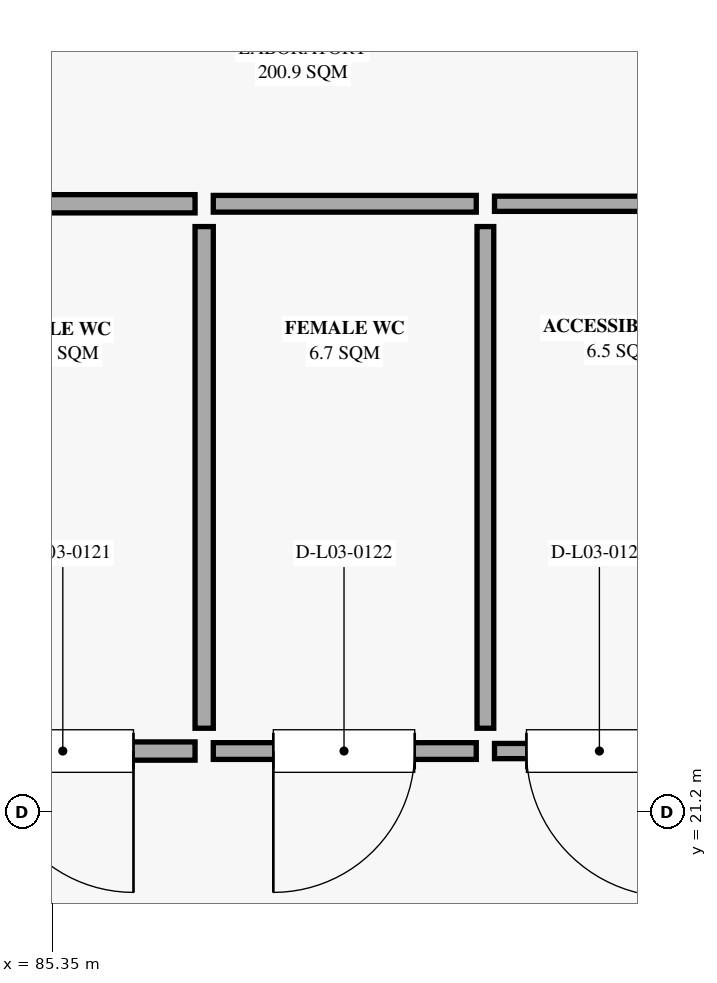
"""IFC4 building model, lengths in metres.
Left out: names, types, materials, properties, quantities, classifications, styles, units other than length and angle.
Written with IfcOpenShell. Run it as: python <this file> out.ifc"""

import sys

from ifc_helpers import new_model, si_unit, direction, frame, frame_2d, origin, place, context, subcontext, project, spatial, rectangle, extrude, element, fill, save


model = new_model("IFC4")
c1 = context("Model", 3, precision=1e-05, world=origin(), true_north=direction((0.0, 1.0)))
c2 = subcontext(c1, "Body", "Model", "MODEL_VIEW")
j1 = project(units=[si_unit("LENGTHUNIT", "METRE"), si_unit("PLANEANGLEUNIT", "RADIAN")], contexts=[c1])
p1 = place(None, origin())
s1 = spatial("IfcSite", under=j1, at=p1, CompositionType="ELEMENT")
p2 = place(p1, origin())
s2 = spatial("IfcBuilding", under=s1, at=p2, CompositionType="ELEMENT")
p3 = place(p2, frame((0.0, 0.0, 15.12)))
s3 = spatial("IfcBuildingStorey", under=s2, at=p3, CompositionType="ELEMENT", Elevation=15.12)
p4 = place(p3, frame((86.29, 21.6, 0.0), z_axis=(0.0, 0.0, 1.0), x_axis=(-1.0, 0.0, 0.0)))
e1 = element("IfcWall", 1, at=p4, inside=s3, PredefinedType="PARTITIONING", context=c2, shape_type="SweptSolid", body=[
    extrude(rectangle(XDim=1.73, YDim=0.12, at=frame_2d((0.865, 0.0))), origin(), (0.0, 0.0, 1.0), 3.16),
])
p5 = place(p4, frame((0.405, 0.0, 0.0)))
e2 = element("IfcOpeningElement", 2, at=p5, cuts=e1, PredefinedType="OPENING", context=c2, shape_type="SweptSolid", body=[
    extrude(rectangle(XDim=0.93, YDim=2.16, at=frame_2d((0.465, 1.08))), frame((0.0, 0.07, 0.0), z_axis=(0.0, -1.0, 0.0), x_axis=(1.0, 0.0, 0.0)), (0.0, 0.0, 1.0), 0.14),
])
p6 = place(p3, frame((84.56, 25.2, 0.0), z_axis=(0.0, 0.0, 1.0), x_axis=(1.0, 0.0, 0.0)))
e3 = element("IfcWall", 3, at=p6, inside=s3, PredefinedType="PARTITIONING", context=c2, shape_type="SweptSolid", body=[
    extrude(rectangle(XDim=1.73, YDim=0.12, at=frame_2d((0.865, 0.0))), origin(), (0.0, 0.0, 1.0), 3.16),
])
p7 = place(p3, frame((86.35, 25.05, 0.0), z_axis=(0.0, 0.0, 1.0), x_axis=(0.0, -1.0, 0.0)))
e4 = element("IfcWall", 4, at=p7, inside=s3, PredefinedType="PARTITIONING", context=c2, shape_type="SweptSolid", body=[
    extrude(rectangle(XDim=3.3, YDim=0.12, at=frame_2d((1.65, 0.0))), origin(), (0.0, 0.0, 1.0), 3.16),
])
p8 = place(p3, frame((88.14, 21.6, 0.0), z_axis=(0.0, 0.0, 1.0), x_axis=(-1.0, 0.0, 0.0)))
e5 = element("IfcWall", 5, at=p8, inside=s3, PredefinedType="PARTITIONING", context=c2, shape_type="SweptSolid", body=[
    extrude(rectangle(XDim=1.73, YDim=0.11, at=frame_2d((0.865, 0.0))), origin(), (0.0, 0.0, 1.0), 3.16),
])
p9 = place(p8, frame((0.405, 0.0, 0.0)))
e6 = element("IfcOpeningElement", 6, at=p9, cuts=e5, PredefinedType="OPENING", context=c2, shape_type="SweptSolid", body=[
    extrude(rectangle(XDim=0.93, YDim=2.22, at=frame_2d((0.465, 1.11))), frame((0.0, 0.065, 0.0), z_axis=(0.0, -1.0, 0.0), x_axis=(1.0, 0.0, 0.0)), (0.0, 0.0, 1.0), 0.13),
])
p10 = place(p3, frame((86.41, 25.2, 0.0), z_axis=(0.0, 0.0, 1.0), x_axis=(1.0, 0.0, 0.0)))
e7 = element("IfcWall", 7, at=p10, inside=s3, PredefinedType="PARTITIONING", context=c2, shape_type="SweptSolid", body=[
    extrude(rectangle(XDim=1.73, YDim=0.11, at=frame_2d((0.865, 0.0))), origin(), (0.0, 0.0, 1.0), 3.16),
])
p11 = place(p3, frame((88.2, 25.05, 0.0), z_axis=(0.0, 0.0, 1.0), x_axis=(0.0, -1.0, 0.0)))
e8 = element("IfcWall", 8, at=p11, inside=s3, PredefinedType="PARTITIONING", context=c2, shape_type="SweptSolid", body=[
    extrude(rectangle(XDim=3.3, YDim=0.11, at=frame_2d((1.65, 0.0))), origin(), (0.0, 0.0, 1.0), 3.16),
])
p12 = place(p3, frame((89.94, 21.6, 0.0), z_axis=(0.0, 0.0, 1.0), x_axis=(-1.0, 0.0, 0.0)))
e9 = element("IfcWall", 9, at=p12, inside=s3, PredefinedType="PARTITIONING", context=c2, shape_type="SweptSolid", body=[
    extrude(rectangle(XDim=1.68, YDim=0.1, at=frame_2d((0.84, 0.0))), origin(), (0.0, 0.0, 1.0), 3.16),
])
p13 = place(p12, frame((0.51, 0.0, 0.0)))
e10 = element("IfcOpeningElement", 10, at=p13, cuts=e9, PredefinedType="OPENING", context=c2, shape_type="SweptSolid", body=[
    extrude(rectangle(XDim=0.96, YDim=2.05, at=frame_2d((0.48, 1.025))), frame((0.0, 0.06, 0.0), z_axis=(0.0, -1.0, 0.0), x_axis=(1.0, 0.0, 0.0)), (0.0, 0.0, 1.0), 0.12),
])
p14 = place(p3, frame((88.26, 25.2, 0.0), z_axis=(0.0, 0.0, 1.0), x_axis=(1.0, 0.0, 0.0)))
e11 = element("IfcWall", 11, at=p14, inside=s3, PredefinedType="PARTITIONING", context=c2, shape_type="SweptSolid", body=[
    extrude(rectangle(XDim=1.68, YDim=0.1, at=frame_2d((0.84, 0.0))), origin(), (0.0, 0.0, 1.0), 3.16),
])
p15 = place(p5, origin())
e12 = element("IfcDoor", 12, at=p15, inside=s3, OperationType="SINGLE_SWING_LEFT", PredefinedType="DOOR", context=c2, shape_type="SweptSolid", body=[
    extrude(rectangle(XDim=0.93, YDim=2.16, at=frame_2d((0.465, 1.08))), frame((0.0, 0.025, 0.0), z_axis=(0.0, -1.0, 0.0), x_axis=(1.0, 0.0, 0.0)), (0.0, 0.0, 1.0), 0.05),
])
fill(e2, e12)
p16 = place(p9, origin())
e13 = element("IfcDoor", 13, at=p16, inside=s3, OperationType="SINGLE_SWING_RIGHT", PredefinedType="DOOR", context=c2, shape_type="SweptSolid", body=[
    extrude(rectangle(XDim=0.93, YDim=2.22, at=frame_2d((0.465, 1.11))), frame((0.0, 0.025, 0.0), z_axis=(0.0, -1.0, 0.0), x_axis=(1.0, 0.0, 0.0)), (0.0, 0.0, 1.0), 0.05),
])
fill(e6, e13)
p17 = place(p13, origin())
e14 = element("IfcDoor", 14, at=p17, inside=s3, OperationType="SINGLE_SWING_LEFT", PredefinedType="DOOR", context=c2, shape_type="SweptSolid", body=[
    extrude(rectangle(XDim=0.96, YDim=2.05, at=frame_2d((0.48, 1.025))), frame((0.0, 0.025, 0.0), z_axis=(0.0, -1.0, 0.0), x_axis=(1.0, 0.0, 0.0)), (0.0, 0.0, 1.0), 0.05),
])
fill(e10, e14)
save(model, sys.argv[1])
